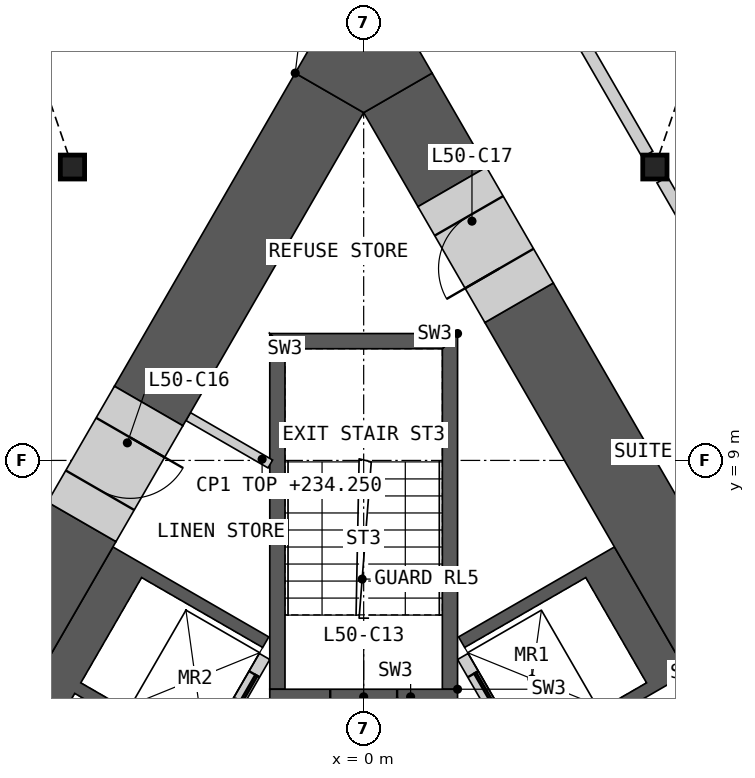
"""IFC4 building model, lengths in metres.
Left out: names, types, materials, properties, quantities, classifications, styles, units other than length and angle.
Written with IfcOpenShell. Run it as: python <this file> out.ifc"""

import sys

from ifc_helpers import new_model, si_unit, direction, frame, frame_2d, origin, origin_2d, place, context, subcontext, project, spatial, polyline, rectangle, i_section, outline, extrude, element, fill, save


model = new_model("IFC4")
c1 = context("Model", 3, precision=1e-05, world=origin(), true_north=direction((0.0, 1.0)))
c2 = subcontext(c1, "Body", "Model", "MODEL_VIEW")
j1 = project(units=[si_unit("LENGTHUNIT", "METRE"), si_unit("PLANEANGLEUNIT", "RADIAN")], contexts=[c1])
p1 = place(None, origin())
s1 = spatial("IfcSite", under=j1, at=p1, CompositionType="ELEMENT")
p2 = place(p1, origin())
s2 = spatial("IfcBuilding", under=s1, at=p2, CompositionType="ELEMENT")
p3 = place(p2, frame((0.0, 0.0, 231.0)))
s3 = spatial("IfcBuildingStorey", under=s2, at=p3, CompositionType="ELEMENT", Elevation=231.0)
for number, where, z_axis, x_axis in (
    (1, (-4.789, 13.825, 0.0), (0.0, 0.0, 1.0), (1.0, 0.0, 0.0)),
    (2, (4.789, 13.825, 0.0), (0.0, 0.0, 1.0), (1.0, 0.0, 0.0)),
):
    element("IfcColumn", number, at=place(p3, frame(where, z_axis=z_axis, x_axis=x_axis)), inside=s3, PredefinedType="COLUMN", context=c2, shape_type="SweptSolid", body=[
        extrude(i_section(OverallWidth=0.399, OverallDepth=0.393, WebThickness=0.023, FlangeThickness=0.037, at=origin_2d()), origin(), (0.0, 0.0, 1.0), 3.6),
    ])
p4 = place(p3, origin())
e3 = element("IfcWall", 3, at=p4, inside=s3, PredefinedType="SHEAR", context=c2, shape_type="SweptSolid", body=[
    extrude(outline(polyline([(5.324, 5.499), (4.931, 5.272), (2.76, 4.019), (2.66, 4.192), (4.652, 5.342), (3.652, 7.074), (1.66, 5.924), (1.561, 6.097), (3.731, 7.35), (4.124, 7.577), (5.324, 5.499)])), origin(), (0.0, 0.0, 1.0), 3.25),
])
p5 = place(p3, frame((5.817, -1.476, 0.0), z_axis=(0.0, 0.0, 1.0), x_axis=(-0.500002616675, 0.866023893041, 0.0)))
e4 = element("IfcWall", 4, at=p5, inside=s3, PredefinedType="SOLIDWALL", context=c2, shape_type="SweptSolid", body=[
    extrude(rectangle(XDim=8.373, YDim=0.2, at=frame_2d((4.187, 0.0))), origin(), (0.0, 0.0, 1.0), 3.25),
])
p6 = place(p5, frame((1.537, 0.0, 0.0)))
e5 = element("IfcOpeningElement", 5, at=p6, cuts=e4, PredefinedType="OPENING", context=c2, shape_type="SweptSolid", body=[
    extrude(rectangle(XDim=0.9, YDim=2.1, at=frame_2d((0.45, 1.05))), frame((0.0, 0.11, 0.0), z_axis=(0.0, -1.0, 0.0), x_axis=(1.0, 0.0, 0.0)), (0.0, 0.0, 1.0), 0.22),
])
p7 = place(p5, frame((4.837, 0.0, 0.0)))
e6 = element("IfcOpeningElement", 6, at=p7, cuts=e4, PredefinedType="OPENING", context=c2, shape_type="SweptSolid", body=[
    extrude(rectangle(XDim=0.9, YDim=2.1, at=frame_2d((0.45, 1.05))), frame((0.0, 0.11, 0.0), z_axis=(0.0, -1.0, 0.0), x_axis=(1.0, 0.0, 0.0)), (0.0, 0.0, 1.0), 0.22),
])
p8 = place(p5, frame((6.937, 0.0, 0.0)))
e7 = element("IfcOpeningElement", 7, at=p8, cuts=e4, PredefinedType="OPENING", context=c2, shape_type="SweptSolid", body=[
    extrude(rectangle(XDim=1.1, YDim=2.1, at=frame_2d((0.55, 1.05))), frame((0.0, 0.11, 0.0), z_axis=(0.0, -1.0, 0.0), x_axis=(1.0, 0.0, 0.0)), (0.0, 0.0, 1.0), 0.22),
])
p9 = place(p3, origin())
e8 = element("IfcWall", 8, at=p9, inside=s3, PredefinedType="SHEAR", context=c2, shape_type="SweptSolid", body=[
    extrude(outline(polyline([(-7.524, 1.688), (-4.124, 7.577), (-3.731, 7.35), (-1.561, 6.097), (-1.66, 5.924), (-3.652, 7.074), (-4.652, 5.342), (-2.66, 4.192), (-2.76, 4.019), (-4.752, 5.169), (-5.752, 3.437), (-3.76, 2.287), (-3.861, 2.113), (-5.852, 3.263), (-6.852, 1.531), (-4.861, 0.381), (-4.96, 0.208), (-7.131, 1.461), (-7.524, 1.688)])), origin(), (0.0, 0.0, 1.0), 3.25),
])
p10 = place(p3, frame((-1.631, 5.776, 0.0), z_axis=(0.0, 0.0, 1.0), x_axis=(-0.499992876559, -0.866029516466, 0.0)))
e9 = element("IfcWall", 9, at=p10, inside=s3, PredefinedType="SOLIDWALL", context=c2, shape_type="SweptSolid", body=[
    extrude(rectangle(XDim=6.486, YDim=0.2, at=frame_2d((3.243, 0.0))), origin(), (0.0, 0.0, 1.0), 3.25),
])
p11 = place(p10, frame((0.337, 0.0, 0.0)))
e10 = element("IfcOpeningElement", 10, at=p11, cuts=e9, PredefinedType="OPENING", context=c2, shape_type="SweptSolid", body=[
    extrude(rectangle(XDim=1.1, YDim=2.1, at=frame_2d((0.55, 1.05))), frame((0.0, 0.11, 0.0), z_axis=(0.0, -1.0, 0.0), x_axis=(1.0, 0.0, 0.0)), (0.0, 0.0, 1.0), 0.22),
])
p12 = place(p10, frame((2.537, 0.0, 0.0)))
e11 = element("IfcOpeningElement", 11, at=p12, cuts=e9, PredefinedType="OPENING", context=c2, shape_type="SweptSolid", body=[
    extrude(rectangle(XDim=1.1, YDim=2.1, at=frame_2d((0.55, 1.05))), frame((0.0, 0.11, 0.0), z_axis=(0.0, -1.0, 0.0), x_axis=(1.0, 0.0, 0.0)), (0.0, 0.0, 1.0), 0.22),
])
p13 = place(p3, origin())
e12 = element("IfcWall", 12, at=p13, inside=s3, PredefinedType="SHEAR", context=c2, shape_type="SweptSolid", body=[
    extrude(outline(polyline([(1.544, 5.237), (1.544, 11.087), (1.294, 10.837), (1.294, 5.237), (1.544, 5.237)])), origin(), (0.0, 0.0, 1.0), 3.25),
])
p14 = place(p3, origin())
e13 = element("IfcWall", 13, at=p14, inside=s3, PredefinedType="SHEAR", context=c2, shape_type="SweptSolid", body=[
    extrude(outline(polyline([(1.544, 11.087), (-1.544, 11.087), (-1.294, 10.837), (1.294, 10.837), (1.544, 11.087)])), origin(), (0.0, 0.0, 1.0), 3.25),
])
p15 = place(p3, origin())
e14 = element("IfcWall", 14, at=p15, inside=s3, PredefinedType="SHEAR", context=c2, shape_type="SweptSolid", body=[
    extrude(outline(polyline([(-1.294, 10.837), (-1.544, 11.087), (-1.544, 5.237), (-1.294, 5.237), (-1.294, 10.837)])), origin(), (0.0, 0.0, 1.0), 3.25),
])
p16 = place(p3, frame((1.544, 5.112, 0.0), z_axis=(0.0, 0.0, 1.0), x_axis=(-1.0, 0.0, 0.0)))
e15 = element("IfcWall", 15, at=p16, inside=s3, PredefinedType="SHEAR", context=c2, shape_type="SweptSolid", body=[
    extrude(rectangle(XDim=3.088, YDim=0.25, at=frame_2d((1.544, 0.0))), origin(), (0.0, 0.0, 1.0), 3.25),
])
p17 = place(p16, frame((0.994, 0.0, 0.0)))
e16 = element("IfcOpeningElement", 16, at=p17, cuts=e15, PredefinedType="OPENING", context=c2, shape_type="SweptSolid", body=[
    extrude(rectangle(XDim=1.1, YDim=2.1, at=frame_2d((0.55, 1.05))), frame((0.0, 0.135, 0.0), z_axis=(0.0, -1.0, 0.0), x_axis=(1.0, 0.0, 0.0)), (0.0, 0.0, 1.0), 0.27),
])
p18 = place(p3, frame((-2.886, 9.721, 0.0), z_axis=(0.0, 0.0, 1.0), x_axis=(0.865990094875, -0.500061151839, 0.0)))
e17 = element("IfcWall", 17, at=p18, inside=s3, PredefinedType="PARTITIONING", context=c2, shape_type="SweptSolid", body=[
    extrude(rectangle(XDim=1.56, YDim=0.15, at=frame_2d((0.78, 0.0))), origin(), (0.0, 0.0, 1.0), 3.25),
])
p19 = place(p3, frame((10.081, -1.441, 0.0), z_axis=(0.0, 0.0, 1.0), x_axis=(-0.500012180433, 0.866018371294, 0.0)))
e18 = element("IfcWall", 18, at=p19, inside=s3, PredefinedType="SHEAR", context=c2, shape_type="SweptSolid", body=[
    extrude(rectangle(XDim=15.05, YDim=1.3, at=frame_2d((7.525, 0.0))), origin(), (0.0, 0.0, 1.0), 3.25),
])
p20 = place(p3, frame((1.456, 13.499, 0.0), z_axis=(0.0, 0.0, 1.0), x_axis=(-0.499990639951, 0.866030807744, 0.0)))
e19 = element("IfcWall", 19, at=p20, inside=s3, PredefinedType="SHEAR", context=c2, shape_type="SweptSolid", body=[
    extrude(rectangle(XDim=1.786, YDim=1.3, at=frame_2d((0.893, 0.0))), origin(), (0.0, 0.0, 1.0), 3.25),
])
p21 = place(p3, frame((-4.636, 7.99, 0.0), z_axis=(0.0, 0.0, 1.0), x_axis=(-0.500022813292, -0.866012232124, 0.0)))
e20 = element("IfcWall", 20, at=p21, inside=s3, PredefinedType="SHEAR", context=c2, shape_type="SweptSolid", body=[
    extrude(rectangle(XDim=6.802, YDim=1.3, at=frame_2d((3.401, 0.0))), origin(), (0.0, 0.0, 1.0), 3.25),
])
p22 = place(p3, frame((-0.563, 15.045, 0.0), z_axis=(0.0, 0.0, 1.0), x_axis=(-0.500011498138, -0.866018765229, 0.0)))
e21 = element("IfcWall", 21, at=p22, inside=s3, PredefinedType="SHEAR", context=c2, shape_type="SweptSolid", body=[
    extrude(rectangle(XDim=5.947, YDim=1.3, at=frame_2d((2.973, 0.0))), origin(), (0.0, 0.0, 1.0), 3.25),
])
p23 = place(p3, origin())
e22 = element("IfcWall", 22, at=p23, inside=s3, PredefinedType="SHEAR", context=c2, shape_type="SweptSolid", body=[
    extrude(outline(polyline([(-1.126, 15.371), (0.0, 17.321), (1.126, 15.371), (0.0, 14.72), (-1.126, 15.371)])), origin(), (0.0, 0.0, 1.0), 3.25),
])
p24 = place(p3, frame((-3.536, 9.896, 0.0), z_axis=(0.0, 0.0, 1.0), x_axis=(-0.499981787252, -0.866035918664, 0.0)))
e23 = element("IfcWall", 23, at=p24, inside=s3, PredefinedType="SHEAR", context=c2, shape_type="SweptSolid", body=[
    extrude(rectangle(XDim=2.2, YDim=1.3, at=frame_2d((1.1, 0.0))), origin(), (0.0, 0.0, 1.0), 3.25),
])
p25 = place(p24, frame((0.6, 0.0, 0.0)))
e24 = element("IfcOpeningElement", 24, at=p25, cuts=e23, PredefinedType="OPENING", context=c2, shape_type="SweptSolid", body=[
    extrude(rectangle(XDim=1.0, YDim=2.1, at=frame_2d((0.5, 1.05))), frame((0.0, 0.66, 0.0), z_axis=(0.0, -1.0, 0.0), x_axis=(1.0, 0.0, 0.0)), (0.0, 0.0, 1.0), 1.32),
])
p26 = place(p3, frame((2.556, 11.593, 0.0), z_axis=(0.0, 0.0, 1.0), x_axis=(-0.499946605688, 0.86605622881, 0.0)))
e25 = element("IfcWall", 25, at=p26, inside=s3, PredefinedType="SHEAR", context=c2, shape_type="SweptSolid", body=[
    extrude(rectangle(XDim=2.2, YDim=1.3, at=frame_2d((1.1, 0.0))), origin(), (0.0, 0.0, 1.0), 3.25),
])
p27 = place(p26, frame((0.65, 0.0, 0.0)))
e26 = element("IfcOpeningElement", 26, at=p27, cuts=e25, PredefinedType="OPENING", context=c2, shape_type="SweptSolid", body=[
    extrude(rectangle(XDim=1.0, YDim=2.1, at=frame_2d((0.5, 1.05))), frame((0.0, 0.66, 0.0), z_axis=(0.0, -1.0, 0.0), x_axis=(1.0, 0.0, 0.0)), (0.0, 0.0, 1.0), 1.32),
])
p28 = place(p3, frame((4.91, 13.616, 0.0), z_axis=(0.0, 0.0, 1.0), x_axis=(0.50000207303, -0.866024206917, 0.0)))
e27 = element("IfcWall", 27, at=p28, inside=s3, PredefinedType="PARTITIONING", context=c2, shape_type="SweptSolid", body=[
    extrude(rectangle(XDim=9.095, YDim=0.2, at=frame_2d((4.547, 0.0))), origin(), (0.0, 0.0, 1.0), 3.25),
])
p29 = place(p3, frame((1.913, 18.807, 0.0), z_axis=(0.0, 0.0, 1.0), x_axis=(0.499984524817, -0.866034338201, 0.0)))
e28 = element("IfcWall", 28, at=p29, inside=s3, PredefinedType="PARTITIONING", context=c2, shape_type="SweptSolid", body=[
    extrude(rectangle(XDim=5.51, YDim=0.2, at=frame_2d((2.755, 0.0))), origin(), (0.0, 0.0, 1.0), 3.25),
])
p30 = place(p29, frame((0.35, 0.0, 0.0)))
e29 = element("IfcOpeningElement", 29, at=p30, cuts=e28, PredefinedType="OPENING", context=c2, shape_type="SweptSolid", body=[
    extrude(rectangle(XDim=1.1, YDim=2.1, at=frame_2d((0.55, 1.05))), frame((0.0, 0.11, 0.0), z_axis=(0.0, -1.0, 0.0), x_axis=(1.0, 0.0, 0.0)), (0.0, 0.0, 1.0), 0.22),
])
p31 = place(p8, origin())
e30 = element("IfcDoor", 30, at=p31, inside=s3, OperationType="SLIDING_TO_LEFT", PredefinedType="DOOR", context=c2, shape_type="SweptSolid", body=[
    extrude(rectangle(XDim=1.1, YDim=2.1, at=frame_2d((0.55, 1.05))), frame((0.0, 0.025, 0.0), z_axis=(0.0, -1.0, 0.0), x_axis=(1.0, 0.0, 0.0)), (0.0, 0.0, 1.0), 0.05),
])
fill(e7, e30)
p32 = place(p11, origin())
e31 = element("IfcDoor", 31, at=p32, inside=s3, OperationType="SLIDING_TO_LEFT", PredefinedType="DOOR", context=c2, shape_type="SweptSolid", body=[
    extrude(rectangle(XDim=1.1, YDim=2.1, at=frame_2d((0.55, 1.05))), frame((0.0, 0.025, 0.0), z_axis=(0.0, -1.0, 0.0), x_axis=(1.0, 0.0, 0.0)), (0.0, 0.0, 1.0), 0.05),
])
fill(e10, e31)
p33 = place(p17, origin())
e32 = element("IfcDoor", 32, at=p33, inside=s3, OperationType="SINGLE_SWING_LEFT", PredefinedType="DOOR", context=c2, shape_type="SweptSolid", body=[
    extrude(rectangle(XDim=1.1, YDim=2.1, at=frame_2d((0.55, 1.05))), frame((0.0, 0.025, 0.0), z_axis=(0.0, -1.0, 0.0), x_axis=(1.0, 0.0, 0.0)), (0.0, 0.0, 1.0), 0.05),
])
fill(e16, e32)
p34 = place(p25, origin())
e33 = element("IfcDoor", 33, at=p34, inside=s3, OperationType="SINGLE_SWING_LEFT", PredefinedType="DOOR", context=c2, shape_type="SweptSolid", body=[
    extrude(rectangle(XDim=1.0, YDim=2.1, at=frame_2d((0.5, 1.05))), frame((0.0, 0.405, 0.0), z_axis=(0.0, -1.0, 0.0), x_axis=(1.0, 0.0, 0.0)), (0.0, 0.0, 1.0), 0.05),
])
fill(e24, e33)
p35 = place(p27, origin())
e34 = element("IfcDoor", 34, at=p35, inside=s3, OperationType="SINGLE_SWING_LEFT", PredefinedType="DOOR", context=c2, shape_type="SweptSolid", body=[
    extrude(rectangle(XDim=1.0, YDim=2.1, at=frame_2d((0.5, 1.05))), frame((0.0, 0.405, 0.0), z_axis=(0.0, -1.0, 0.0), x_axis=(1.0, 0.0, 0.0)), (0.0, 0.0, 1.0), 0.05),
])
fill(e26, e34)
save(model, sys.argv[1])
